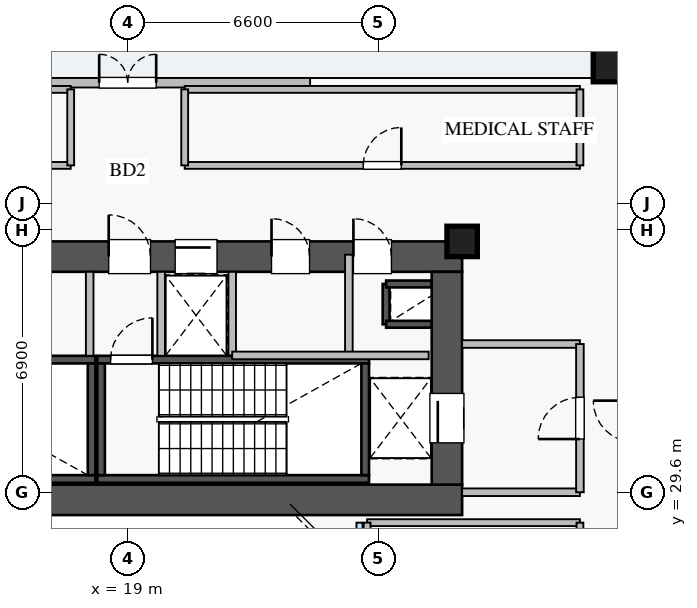
"""IFC4 building model, lengths in metres.
Left out: names, types, materials, properties, quantities, classifications, styles, units other than length and angle.
Written with IfcOpenShell. Run it as: python <this file> out.ifc"""

import sys

from ifc_helpers import new_model, si_unit, direction, frame, frame_2d, origin, origin_2d, place, context, subcontext, project, spatial, rectangle, extrude, source, transform, mapped, element, fill, save


model = new_model("IFC4")
c1 = context("Model", 3, precision=1e-05, world=origin(), true_north=direction((0.0, 1.0)))
c2 = subcontext(c1, "Body", "Model", "MODEL_VIEW")
j1 = project(units=[si_unit("LENGTHUNIT", "METRE"), si_unit("PLANEANGLEUNIT", "RADIAN")], contexts=[c1])
p1 = place(None, origin())
s1 = spatial("IfcSite", under=j1, at=p1, CompositionType="ELEMENT")
p2 = place(p1, origin())
s2 = spatial("IfcBuilding", under=s1, at=p2, CompositionType="ELEMENT")
p3 = place(p2, frame((0.0, 0.0, 13.8)))
s3 = spatial("IfcBuildingStorey", under=s2, at=p3, CompositionType="ELEMENT", Elevation=13.8)
p4 = place(p3, frame((25.8, 34.02, 0.0), z_axis=(0.0, 0.0, 1.0), x_axis=(0.0, 1.0, 0.0)))
e1 = element("IfcWall", 1, at=p4, inside=s3, PredefinedType="SHEAR", context=c2, shape_type="SweptSolid", body=[
    extrude(rectangle(XDim=1.06, YDim=0.18, at=frame_2d((0.53, 0.0))), origin(), (0.0, 0.0, 1.0), 4.15),
])
for number, where, z_axis, x_axis in (
    (2, (25.8, 35.08, 0.0), (0.0, 0.0, 1.0), (1.0, 0.0, 0.0)),
    (3, (25.8, 34.02, 0.0), (0.0, 0.0, 1.0), (1.0, 0.0, 0.0)),
):
    element("IfcWall", number, at=place(p3, frame(where, z_axis=z_axis, x_axis=x_axis)), inside=s3, PredefinedType="SHEAR", context=c2, shape_type="SweptSolid", body=[
        extrude(rectangle(XDim=1.2, YDim=0.18, at=frame_2d((0.6, 0.0))), origin(), (0.0, 0.0, 1.0), 4.15),
    ])
p5 = place(p3, frame((19.88, 33.2, 0.0), z_axis=(0.0, 0.0, 1.0), x_axis=(1.0, 0.0, 0.0)))
e4 = element("IfcWall", 4, at=p5, inside=s3, PredefinedType="SHEAR", context=c2, shape_type="SweptSolid", body=[
    extrude(rectangle(XDim=1.87, YDim=0.18, at=frame_2d((0.935, 0.0))), origin(), (0.0, 0.0, 1.0), 4.15),
])
p6 = place(p3, frame((11.0, 29.95, 0.0), z_axis=(0.0, 0.0, 1.0), x_axis=(1.0, 0.0, 0.0)))
e5 = element("IfcWall", 5, at=p6, inside=s3, PredefinedType="SHEAR", context=c2, shape_type="SweptSolid", body=[
    extrude(rectangle(XDim=7.15, YDim=0.2, at=frame_2d((3.575, 0.0))), origin(), (0.0, 0.0, 1.0), 4.4),
])
p7 = place(p3, frame((11.0, 33.09, 0.0), z_axis=(0.0, 0.0, 1.0), x_axis=(1.0, 0.0, 0.0)))
e6 = element("IfcWall", 6, at=p7, inside=s3, PredefinedType="SHEAR", context=c2, shape_type="SweptSolid", body=[
    extrude(rectangle(XDim=7.15, YDim=0.2, at=frame_2d((3.575, 0.0))), origin(), (0.0, 0.0, 1.0), 4.4),
])
p8 = place(p7, frame((0.35, 0.0, 0.0)))
e7 = element("IfcOpeningElement", 7, at=p8, cuts=e6, PredefinedType="OPENING", context=c2, shape_type="SweptSolid", body=[
    extrude(rectangle(XDim=1.1, YDim=2.05, at=frame_2d((0.55, 1.025))), frame((0.0, 0.11, 0.0), z_axis=(0.0, -1.0, 0.0), x_axis=(1.0, 0.0, 0.0)), (0.0, 0.0, 1.0), 0.22),
])
p9 = place(p3, frame((18.05, 30.05, 0.0), z_axis=(0.0, 0.0, 1.0), x_axis=(0.0, 1.0, 0.0)))
e8 = element("IfcWall", 8, at=p9, inside=s3, PredefinedType="SHEAR", context=c2, shape_type="SweptSolid", body=[
    extrude(rectangle(XDim=2.94, YDim=0.2, at=frame_2d((1.47, 0.0))), origin(), (0.0, 0.0, 1.0), 4.4),
])
p10 = place(p3, frame((18.2, 29.95, 0.0), z_axis=(0.0, 0.0, 1.0), x_axis=(1.0, 0.0, 0.0)))
e9 = element("IfcWall", 9, at=p10, inside=s3, PredefinedType="SHEAR", context=c2, shape_type="SweptSolid", body=[
    extrude(rectangle(XDim=7.15, YDim=0.2, at=frame_2d((3.575, 0.0))), origin(), (0.0, 0.0, 1.0), 4.4),
])
p11 = place(p3, frame((18.2, 33.09, 0.0), z_axis=(0.0, 0.0, 1.0), x_axis=(1.0, 0.0, 0.0)))
e10 = element("IfcWall", 10, at=p11, inside=s3, PredefinedType="SHEAR", context=c2, shape_type="SweptSolid", body=[
    extrude(rectangle(XDim=7.15, YDim=0.2, at=frame_2d((3.575, 0.0))), origin(), (0.0, 0.0, 1.0), 4.4),
])
p12 = place(p11, frame((0.35, 0.0, 0.0)))
e11 = element("IfcOpeningElement", 11, at=p12, cuts=e10, PredefinedType="OPENING", context=c2, shape_type="SweptSolid", body=[
    extrude(rectangle(XDim=1.1, YDim=2.05, at=frame_2d((0.55, 1.025))), frame((0.0, 0.11, 0.0), z_axis=(0.0, -1.0, 0.0), x_axis=(1.0, 0.0, 0.0)), (0.0, 0.0, 1.0), 0.22),
])
for number, where, z_axis, x_axis in (
    (12, (18.3, 30.05, 0.0), (0.0, 0.0, 1.0), (0.0, 1.0, 0.0)),
    (13, (25.25, 30.05, 0.0), (0.0, 0.0, 1.0), (0.0, 1.0, 0.0)),
):
    element("IfcWall", number, at=place(p3, frame(where, z_axis=z_axis, x_axis=x_axis)), inside=s3, PredefinedType="SHEAR", context=c2, shape_type="SweptSolid", body=[
        extrude(rectangle(XDim=2.94, YDim=0.2, at=frame_2d((1.47, 0.0))), origin(), (0.0, 0.0, 1.0), 4.4),
    ])
p13 = place(p3, frame((10.2, 29.4, 0.0), z_axis=(0.0, 0.0, 1.0), x_axis=(1.0, 0.0, 0.0)))
e14 = element("IfcWall", 14, at=p13, inside=s3, PredefinedType="SHEAR", context=c2, shape_type="SweptSolid", body=[
    extrude(rectangle(XDim=17.6, YDim=0.8, at=frame_2d((8.8, 0.0))), origin(), (0.0, 0.0, 1.0), 4.4),
])
p14 = place(p3, frame((10.2, 35.8, 0.0), z_axis=(0.0, 0.0, 1.0), x_axis=(1.0, 0.0, 0.0)))
e15 = element("IfcWall", 15, at=p14, inside=s3, PredefinedType="SHEAR", context=c2, shape_type="SweptSolid", body=[
    extrude(rectangle(XDim=17.6, YDim=0.8, at=frame_2d((8.8, 0.0))), origin(), (0.0, 0.0, 1.0), 4.4),
])
p15 = place(p14, frame((1.15, 0.0, 0.0)))
e16 = element("IfcOpeningElement", 16, at=p15, cuts=e15, PredefinedType="OPENING", context=c2, shape_type="SweptSolid", body=[
    extrude(rectangle(XDim=1.1, YDim=2.05, at=frame_2d((0.55, 1.025))), frame((0.0, 0.41, 0.0), z_axis=(0.0, -1.0, 0.0), x_axis=(1.0, 0.0, 0.0)), (0.0, 0.0, 1.0), 0.82),
])
p16 = place(p14, frame((8.3, 0.0, 0.0)))
e17 = element("IfcOpeningElement", 17, at=p16, cuts=e15, PredefinedType="OPENING", context=c2, shape_type="SweptSolid", body=[
    extrude(rectangle(XDim=1.1, YDim=2.05, at=frame_2d((0.55, 1.025))), frame((0.0, 0.41, 0.0), z_axis=(0.0, -1.0, 0.0), x_axis=(1.0, 0.0, 0.0)), (0.0, 0.0, 1.0), 0.82),
])
p17 = place(p14, frame((10.05, 0.0, 0.0)))
e18 = element("IfcOpeningElement", 18, at=p17, cuts=e15, PredefinedType="OPENING", context=c2, shape_type="SweptSolid", body=[
    extrude(rectangle(XDim=1.1, YDim=2.05, at=frame_2d((0.55, 1.025))), frame((0.0, 0.41, 0.0), z_axis=(0.0, -1.0, 0.0), x_axis=(1.0, 0.0, 0.0)), (0.0, 0.0, 1.0), 0.82),
])
p18 = place(p14, frame((14.74, 0.0, 0.0)))
e19 = element("IfcOpeningElement", 19, at=p18, cuts=e15, PredefinedType="OPENING", context=c2, shape_type="SweptSolid", body=[
    extrude(rectangle(XDim=1.0, YDim=2.05, at=frame_2d((0.5, 1.025))), frame((0.0, 0.41, 0.0), z_axis=(0.0, -1.0, 0.0), x_axis=(1.0, 0.0, 0.0)), (0.0, 0.0, 1.0), 0.82),
])
p19 = place(p14, frame((12.585, 0.0, 0.0)))
e20 = element("IfcOpeningElement", 20, at=p19, cuts=e15, PredefinedType="OPENING", context=c2, shape_type="SweptSolid", body=[
    extrude(rectangle(XDim=1.0, YDim=2.05, at=frame_2d((0.5, 1.025))), frame((0.0, 0.41, 0.0), z_axis=(0.0, -1.0, 0.0), x_axis=(1.0, 0.0, 0.0)), (0.0, 0.0, 1.0), 0.82),
])
p20 = place(p3, frame((27.4, 29.8, 0.0), z_axis=(0.0, 0.0, 1.0), x_axis=(0.0, 1.0, 0.0)))
e21 = element("IfcWall", 21, at=p20, inside=s3, PredefinedType="SHEAR", context=c2, shape_type="SweptSolid", body=[
    extrude(rectangle(XDim=5.6, YDim=0.8, at=frame_2d((2.8, 0.0))), origin(), (0.0, 0.0, 1.0), 4.4),
])
p21 = place(p20, frame((1.1, 0.0, 0.0)))
e22 = element("IfcOpeningElement", 22, at=p21, cuts=e21, PredefinedType="OPENING", context=c2, shape_type="SweptSolid", body=[
    extrude(rectangle(XDim=1.3, YDim=2.05, at=frame_2d((0.65, 1.025))), frame((0.0, 0.41, 0.0), z_axis=(0.0, -1.0, 0.0), x_axis=(1.0, 0.0, 0.0)), (0.0, 0.0, 1.0), 0.82),
])
m1 = source(origin(), c2, "Body", "SweptSolid", [
    extrude(rectangle(XDim=1.5, YDim=1.5, at=origin_2d()), origin(), (0.0, 0.0, 1.0), 4.4),
])
p22 = place(p3, frame((32.0, 41.15, 0.0), z_axis=(0.0, 0.0, 1.0), x_axis=(1.0, 0.0, 0.0)))
e23 = element("IfcColumn", 23, at=p22, inside=s3, PredefinedType="COLUMN", context=c2, shape_type="MappedRepresentation", body=[
    mapped(m1, transform((0.0, 0.0, 0.0), x_axis=(1.0, 0.0, 0.0), y_axis=(0.0, 1.0, 0.0), z_axis=(0.0, 0.0, 1.0), scale=1.0)),
])
m2 = source(origin(), c2, "Body", "SweptSolid", [
    extrude(rectangle(XDim=0.8, YDim=0.8, at=origin_2d()), origin(), (0.0, 0.0, 1.0), 4.4),
])
p23 = place(p3, frame((27.8, 36.2, 0.0), z_axis=(0.0, 0.0, 1.0), x_axis=(1.0, 0.0, 0.0)))
e24 = element("IfcColumn", 24, at=p23, inside=s3, PredefinedType="PILASTER", context=c2, shape_type="MappedRepresentation", body=[
    mapped(m2, transform((0.0, 0.0, 0.0), x_axis=(1.0, 0.0, 0.0), y_axis=(0.0, 1.0, 0.0), z_axis=(0.0, 0.0, 1.0), scale=1.0)),
])
p24 = place(p3, frame((14.2, 40.375, 0.0), z_axis=(0.0, 0.0, 1.0), x_axis=(1.0, 0.0, 0.0)))
e25 = element("IfcWall", 25, at=p24, inside=s3, PredefinedType="STANDARD", context=c2, shape_type="SweptSolid", body=[
    extrude(rectangle(XDim=9.6, YDim=0.25, at=frame_2d((4.8, 0.0))), origin(), (0.0, 0.0, 1.0), 3.69),
])
p25 = place(p24, frame((4.05, 0.0, 0.0)))
e26 = element("IfcOpeningElement", 26, at=p25, cuts=e25, PredefinedType="OPENING", context=c2, shape_type="SweptSolid", body=[
    extrude(rectangle(XDim=1.5, YDim=2.15, at=frame_2d((0.75, 1.075))), frame((0.0, 0.135, 0.0), z_axis=(0.0, -1.0, 0.0), x_axis=(1.0, 0.0, 0.0)), (0.0, 0.0, 1.0), 0.27),
])
for number, where, z_axis, x_axis in (
    (27, (27.8, 29.6, 0.0), (0.0, 0.0, 1.0), (1.0, 0.0, 0.0)),
    (28, (27.8, 33.5, 0.0), (0.0, 0.0, 1.0), (1.0, 0.0, 0.0)),
):
    element("IfcWall", number, at=place(p3, frame(where, z_axis=z_axis, x_axis=x_axis)), inside=s3, PredefinedType="PARTITIONING", context=c2, shape_type="SweptSolid", body=[
        extrude(rectangle(XDim=3.1, YDim=0.2, at=frame_2d((1.55, 0.0))), origin(), (0.0, 0.0, 1.0), 3.445),
    ])
p26 = place(p3, frame((30.9, 29.6, 0.0), z_axis=(0.0, 0.0, 1.0), x_axis=(0.0, 1.0, 0.0)))
e29 = element("IfcWall", 29, at=p26, inside=s3, PredefinedType="PARTITIONING", context=c2, shape_type="SweptSolid", body=[
    extrude(rectangle(XDim=3.9, YDim=0.2, at=frame_2d((1.95, 0.0))), origin(), (0.0, 0.0, 1.0), 4.15),
])
p27 = place(p26, frame((1.4, 0.0, 0.0)))
e30 = element("IfcOpeningElement", 30, at=p27, cuts=e29, PredefinedType="OPENING", context=c2, shape_type="SweptSolid", body=[
    extrude(rectangle(XDim=1.1, YDim=2.05, at=frame_2d((0.55, 1.025))), frame((0.0, 0.11, 0.0), z_axis=(0.0, -1.0, 0.0), x_axis=(1.0, 0.0, 0.0)), (0.0, 0.0, 1.0), 0.22),
])
for number, where, z_axis, x_axis in (
    (31, (18.0, 33.19, 0.0), (0.0, 0.0, 1.0), (0.0, 1.0, 0.0)),
    (32, (19.88, 33.19, 0.0), (0.0, 0.0, 1.0), (0.0, 1.0, 0.0)),
):
    element("IfcWall", number, at=place(p3, frame(where, z_axis=z_axis, x_axis=x_axis)), inside=s3, PredefinedType="PARTITIONING", context=c2, shape_type="SweptSolid", body=[
        extrude(rectangle(XDim=2.21, YDim=0.2, at=frame_2d((1.105, 0.0))), origin(), (0.0, 0.0, 1.0), 4.15),
    ])
p28 = place(p3, frame((24.82, 33.2, 0.0), z_axis=(0.0, 0.0, 1.0), x_axis=(0.0, 1.0, 0.0)))
e33 = element("IfcWall", 33, at=p28, inside=s3, PredefinedType="PARTITIONING", context=c2, shape_type="SweptSolid", body=[
    extrude(rectangle(XDim=2.65, YDim=0.2, at=frame_2d((1.325, 0.0))), origin(), (0.0, 0.0, 1.0), 4.15),
])
p29 = place(p3, frame((21.75, 33.2, 0.0), z_axis=(0.0, 0.0, 1.0), x_axis=(0.0, 1.0, 0.0)))
e34 = element("IfcWall", 34, at=p29, inside=s3, PredefinedType="PARTITIONING", context=c2, shape_type="SweptSolid", body=[
    extrude(rectangle(XDim=2.2, YDim=0.2, at=frame_2d((1.1, 0.0))), origin(), (0.0, 0.0, 1.0), 4.15),
])
p30 = place(p3, frame((21.75, 33.2, 0.0), z_axis=(0.0, 0.0, 1.0), x_axis=(1.0, 0.0, 0.0)))
e35 = element("IfcWall", 35, at=p30, inside=s3, PredefinedType="PARTITIONING", context=c2, shape_type="SweptSolid", body=[
    extrude(rectangle(XDim=5.17, YDim=0.2, at=frame_2d((2.585, 0.0))), origin(), (0.0, 0.0, 1.0), 4.15),
])
p31 = place(p3, frame((25.3, 28.8, 0.0), z_axis=(0.0, 0.0, 1.0), x_axis=(1.0, 0.0, 0.0)))
e36 = element("IfcWall", 36, at=p31, inside=s3, PredefinedType="PARTITIONING", context=c2, shape_type="SweptSolid", body=[
    extrude(rectangle(XDim=5.6, YDim=0.18, at=frame_2d((2.8, 0.0))), origin(), (0.0, 0.0, 1.0), 4.15),
])
p32 = place(p3, frame((25.3, 17.2, 0.0), z_axis=(0.0, 0.0, 1.0), x_axis=(0.0, 1.0, 0.0)))
e37 = element("IfcWall", 37, at=p32, inside=s3, PredefinedType="PARTITIONING", context=c2, shape_type="SweptSolid", body=[
    extrude(rectangle(XDim=11.6, YDim=0.18, at=frame_2d((5.8, 0.0))), origin(), (0.0, 0.0, 1.0), 4.15),
])
p33 = place(p3, frame((30.9, 17.2, 0.0), z_axis=(0.0, 0.0, 1.0), x_axis=(0.0, 1.0, 0.0)))
e38 = element("IfcWall", 38, at=p33, inside=s3, PredefinedType="PARTITIONING", context=c2, shape_type="SweptSolid", body=[
    extrude(rectangle(XDim=11.6, YDim=0.18, at=frame_2d((5.8, 0.0))), origin(), (0.0, 0.0, 1.0), 4.15),
])
p34 = place(p33, frame((5.3, 0.0, 0.0)))
e39 = element("IfcOpeningElement", 39, at=p34, cuts=e38, PredefinedType="OPENING", context=c2, shape_type="SweptSolid", body=[
    extrude(rectangle(XDim=1.0, YDim=2.05, at=frame_2d((0.5, 1.025))), frame((0.0, 0.1, 0.0), z_axis=(0.0, -1.0, 0.0), x_axis=(1.0, 0.0, 0.0)), (0.0, 0.0, 1.0), 0.2),
])
p35 = place(p3, frame((10.2, 38.2, 0.0), z_axis=(0.0, 0.0, 1.0), x_axis=(1.0, 0.0, 0.0)))
e40 = element("IfcWall", 40, at=p35, inside=s3, PredefinedType="PARTITIONING", context=c2, shape_type="SweptSolid", body=[
    extrude(rectangle(XDim=7.3, YDim=0.18, at=frame_2d((3.65, 0.0))), origin(), (0.0, 0.0, 1.0), 4.15),
])
p36 = place(p35, frame((3.15, 0.0, 0.0)))
e41 = element("IfcOpeningElement", 41, at=p36, cuts=e40, PredefinedType="OPENING", context=c2, shape_type="SweptSolid", body=[
    extrude(rectangle(XDim=1.0, YDim=2.05, at=frame_2d((0.5, 1.025))), frame((0.0, 0.1, 0.0), z_axis=(0.0, -1.0, 0.0), x_axis=(1.0, 0.0, 0.0)), (0.0, 0.0, 1.0), 0.2),
])
p37 = place(p3, frame((10.2, 40.2, 0.0), z_axis=(0.0, 0.0, 1.0), x_axis=(1.0, 0.0, 0.0)))
e42 = element("IfcWall", 42, at=p37, inside=s3, PredefinedType="PARTITIONING", context=c2, shape_type="SweptSolid", body=[
    extrude(rectangle(XDim=7.3, YDim=0.18, at=frame_2d((3.65, 0.0))), origin(), (0.0, 0.0, 1.0), 4.15),
])
p38 = place(p3, frame((17.5, 38.2, 0.0), z_axis=(0.0, 0.0, 1.0), x_axis=(0.0, 1.0, 0.0)))
e43 = element("IfcWall", 43, at=p38, inside=s3, PredefinedType="PARTITIONING", context=c2, shape_type="SweptSolid", body=[
    extrude(rectangle(XDim=2.0, YDim=0.18, at=frame_2d((1.0, 0.0))), origin(), (0.0, 0.0, 1.0), 4.15),
])
p39 = place(p3, frame((20.5, 38.2, 0.0), z_axis=(0.0, 0.0, 1.0), x_axis=(1.0, 0.0, 0.0)))
e44 = element("IfcWall", 44, at=p39, inside=s3, PredefinedType="PARTITIONING", context=c2, shape_type="SweptSolid", body=[
    extrude(rectangle(XDim=10.4, YDim=0.18, at=frame_2d((5.2, 0.0))), origin(), (0.0, 0.0, 1.0), 4.15),
])
p40 = place(p39, frame((4.7, 0.0, 0.0)))
e45 = element("IfcOpeningElement", 45, at=p40, cuts=e44, PredefinedType="OPENING", context=c2, shape_type="SweptSolid", body=[
    extrude(rectangle(XDim=1.0, YDim=2.05, at=frame_2d((0.5, 1.025))), frame((0.0, 0.1, 0.0), z_axis=(0.0, -1.0, 0.0), x_axis=(1.0, 0.0, 0.0)), (0.0, 0.0, 1.0), 0.2),
])
p41 = place(p3, frame((20.5, 40.2, 0.0), z_axis=(0.0, 0.0, 1.0), x_axis=(1.0, 0.0, 0.0)))
e46 = element("IfcWall", 46, at=p41, inside=s3, PredefinedType="PARTITIONING", context=c2, shape_type="SweptSolid", body=[
    extrude(rectangle(XDim=10.4, YDim=0.18, at=frame_2d((5.2, 0.0))), origin(), (0.0, 0.0, 1.0), 4.15),
])
for number, where, z_axis, x_axis in (
    (47, (20.5, 38.2, 0.0), (0.0, 0.0, 1.0), (0.0, 1.0, 0.0)),
    (48, (30.9, 38.2, 0.0), (0.0, 0.0, 1.0), (0.0, 1.0, 0.0)),
):
    element("IfcWall", number, at=place(p3, frame(where, z_axis=z_axis, x_axis=x_axis)), inside=s3, PredefinedType="PARTITIONING", context=c2, shape_type="SweptSolid", body=[
        extrude(rectangle(XDim=2.0, YDim=0.18, at=frame_2d((1.0, 0.0))), origin(), (0.0, 0.0, 1.0), 4.15),
    ])
m3 = source(origin(), c2, "Body", "SweptSolid", [
    extrude(rectangle(XDim=1.5, YDim=2.15, at=frame_2d((0.75, 1.075))), frame((0.0, 0.025, 0.0), z_axis=(0.0, -1.0, 0.0), x_axis=(1.0, 0.0, 0.0)), (0.0, 0.0, 1.0), 0.05),
])
p42 = place(p25, origin())
e49 = element("IfcDoor", 49, at=p42, inside=s3, OperationType="DOUBLE_DOOR_SINGLE_SWING", PredefinedType="DOOR", context=c2, shape_type="MappedRepresentation", body=[
    mapped(m3, transform((0.0, 0.0, 0.0), x_axis=(1.0, 0.0, 0.0), y_axis=(0.0, 1.0, 0.0), z_axis=(0.0, 0.0, 1.0), scale=1.0)),
])
fill(e26, e49)
m4 = source(origin(), c2, "Body", "SweptSolid", [
    extrude(rectangle(XDim=1.3, YDim=2.05, at=frame_2d((0.65, 1.025))), frame((0.0, 0.025, 0.0), z_axis=(0.0, -1.0, 0.0), x_axis=(1.0, 0.0, 0.0)), (0.0, 0.0, 1.0), 0.05),
])
p43 = place(p21, origin())
e50 = element("IfcDoor", 50, at=p43, inside=s3, OperationType="SLIDING_TO_LEFT", PredefinedType="DOOR", context=c2, shape_type="MappedRepresentation", body=[
    mapped(m4, transform((0.0, 0.0, 0.0), x_axis=(1.0, 0.0, 0.0), y_axis=(0.0, 1.0, 0.0), z_axis=(0.0, 0.0, 1.0), scale=1.0)),
])
fill(e22, e50)
m5 = source(origin(), c2, "Body", "SweptSolid", [
    extrude(rectangle(XDim=1.1, YDim=2.05, at=frame_2d((0.55, 1.025))), frame((0.0, 0.025, 0.0), z_axis=(0.0, -1.0, 0.0), x_axis=(1.0, 0.0, 0.0)), (0.0, 0.0, 1.0), 0.05),
])
p44 = place(p16, origin())
e51 = element("IfcDoor", 51, at=p44, inside=s3, OperationType="SINGLE_SWING_LEFT", PredefinedType="DOOR", context=c2, shape_type="MappedRepresentation", body=[
    mapped(m5, transform((0.0, 0.0, 0.0), x_axis=(1.0, 0.0, 0.0), y_axis=(0.0, 1.0, 0.0), z_axis=(0.0, 0.0, 1.0), scale=1.0)),
])
fill(e17, e51)
p45 = place(p12, origin())
e52 = element("IfcDoor", 52, at=p45, inside=s3, OperationType="SINGLE_SWING_RIGHT", PredefinedType="DOOR", context=c2, shape_type="MappedRepresentation", body=[
    mapped(m5, transform((0.0, 0.0, 0.0), x_axis=(1.0, 0.0, 0.0), y_axis=(0.0, 1.0, 0.0), z_axis=(0.0, 0.0, 1.0), scale=1.0)),
])
fill(e11, e52)
p46 = place(p17, origin())
e53 = element("IfcDoor", 53, at=p46, inside=s3, OperationType="SLIDING_TO_LEFT", PredefinedType="DOOR", context=c2, shape_type="MappedRepresentation", body=[
    mapped(m5, transform((0.0, 0.0, 0.0), x_axis=(1.0, 0.0, 0.0), y_axis=(0.0, 1.0, 0.0), z_axis=(0.0, 0.0, 1.0), scale=1.0)),
])
fill(e18, e53)
m6 = source(origin(), c2, "Body", "SweptSolid", [
    extrude(rectangle(XDim=1.0, YDim=2.05, at=frame_2d((0.5, 1.025))), frame((0.0, 0.025, 0.0), z_axis=(0.0, -1.0, 0.0), x_axis=(1.0, 0.0, 0.0)), (0.0, 0.0, 1.0), 0.05),
])
p47 = place(p18, origin())
e54 = element("IfcDoor", 54, at=p47, inside=s3, OperationType="SINGLE_SWING_LEFT", PredefinedType="DOOR", context=c2, shape_type="MappedRepresentation", body=[
    mapped(m6, transform((0.0, 0.0, 0.0), x_axis=(1.0, 0.0, 0.0), y_axis=(0.0, 1.0, 0.0), z_axis=(0.0, 0.0, 1.0), scale=1.0)),
])
fill(e19, e54)
p48 = place(p19, origin())
e55 = element("IfcDoor", 55, at=p48, inside=s3, OperationType="SINGLE_SWING_LEFT", PredefinedType="DOOR", context=c2, shape_type="MappedRepresentation", body=[
    mapped(m6, transform((0.0, 0.0, 0.0), x_axis=(1.0, 0.0, 0.0), y_axis=(0.0, 1.0, 0.0), z_axis=(0.0, 0.0, 1.0), scale=1.0)),
])
fill(e20, e55)
p49 = place(p27, origin())
e56 = element("IfcDoor", 56, at=p49, inside=s3, OperationType="SINGLE_SWING_LEFT", PredefinedType="DOOR", context=c2, shape_type="MappedRepresentation", body=[
    mapped(m5, transform((0.0, 0.0, 0.0), x_axis=(1.0, 0.0, 0.0), y_axis=(0.0, 1.0, 0.0), z_axis=(0.0, 0.0, 1.0), scale=1.0)),
])
fill(e30, e56)
p50 = place(p40, origin())
e57 = element("IfcDoor", 57, at=p50, inside=s3, OperationType="SINGLE_SWING_RIGHT", PredefinedType="DOOR", context=c2, shape_type="MappedRepresentation", body=[
    mapped(m6, transform((0.0, 0.0, 0.0), x_axis=(1.0, 0.0, 0.0), y_axis=(0.0, 1.0, 0.0), z_axis=(0.0, 0.0, 1.0), scale=1.0)),
])
fill(e45, e57)
save(model, sys.argv[1])
